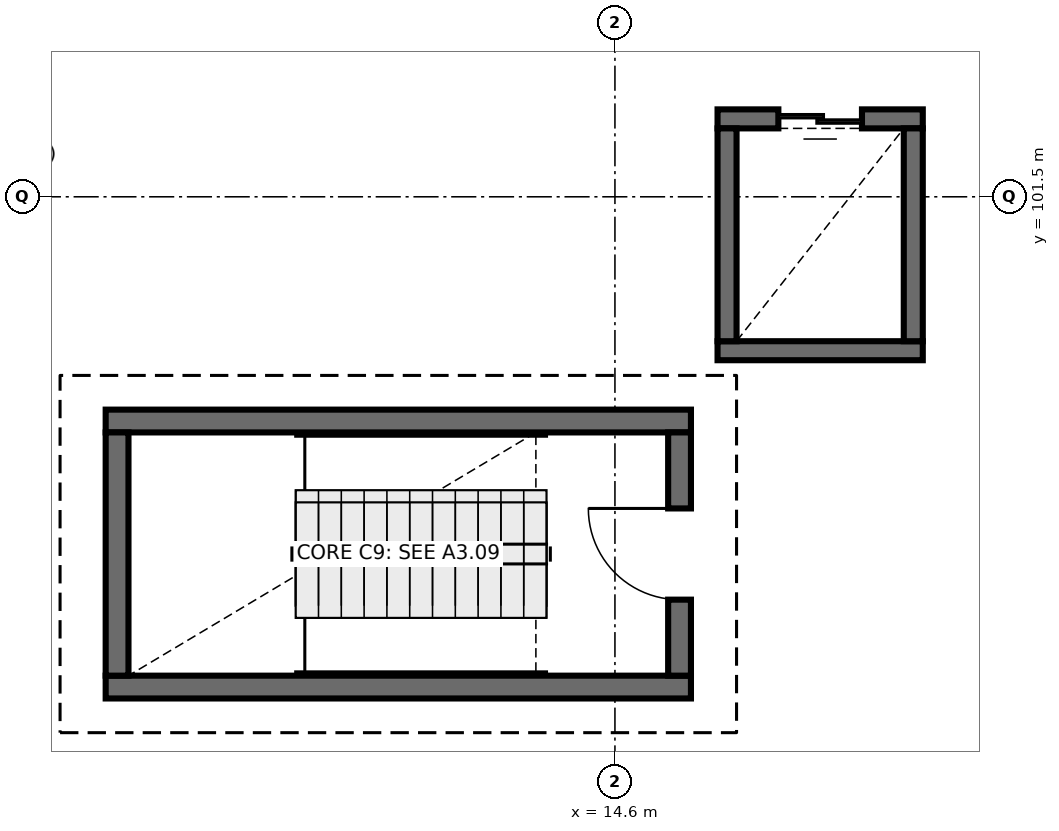
"""IFC4 building model, lengths in metres.
Left out: names, types, materials, properties, quantities, classifications, styles, units other than length and angle.
Written with IfcOpenShell. Run it as: python <this file> out.ifc"""

import sys

from ifc_helpers import new_model, si_unit, direction, frame, frame_2d, origin, place, context, subcontext, project, spatial, rectangle, extrude, element, fill, save


model = new_model("IFC4")
c1 = context("Model", 3, precision=1e-05, world=origin(), true_north=direction((0.0, 1.0)))
c2 = subcontext(c1, "Body", "Model", "MODEL_VIEW")
j1 = project(units=[si_unit("LENGTHUNIT", "METRE"), si_unit("PLANEANGLEUNIT", "RADIAN")], contexts=[c1])
p1 = place(None, origin())
s1 = spatial("IfcSite", under=j1, at=p1, CompositionType="ELEMENT")
p2 = place(p1, origin())
s2 = spatial("IfcBuilding", under=s1, at=p2, CompositionType="ELEMENT")
p3 = place(p2, frame((0.0, 0.0, 9.3)))
s3 = spatial("IfcBuildingStorey", under=s2, at=p3, CompositionType="ELEMENT", Elevation=9.3)
for number, where, z_axis, x_axis in (
    (1, (7.9, 95.05, 0.0), (0.0, 0.0, 1.0), (1.0, 0.0, 0.0)),
    (2, (15.6, 98.55, 0.0), (0.0, 0.0, 1.0), (-1.0, 0.0, 0.0)),
):
    element("IfcWall", number, at=place(p3, frame(where, z_axis=z_axis, x_axis=x_axis)), inside=s3, PredefinedType="SHEAR", context=c2, shape_type="SweptSolid", body=[
        extrude(rectangle(XDim=7.7, YDim=0.3, at=frame_2d((3.85, 0.0))), origin(), (0.0, 0.0, 1.0), 4.5),
    ])
p4 = place(p3, frame((8.05, 98.4, 0.0), z_axis=(0.0, 0.0, 1.0), x_axis=(0.0, -1.0, 0.0)))
e3 = element("IfcWall", 3, at=p4, inside=s3, PredefinedType="SHEAR", context=c2, shape_type="SweptSolid", body=[
    extrude(rectangle(XDim=3.2, YDim=0.3, at=frame_2d((1.6, 0.0))), origin(), (0.0, 0.0, 1.0), 4.5),
])
p5 = place(p3, frame((15.45, 95.2, 0.0), z_axis=(0.0, 0.0, 1.0), x_axis=(0.0, 1.0, 0.0)))
e4 = element("IfcWall", 4, at=p5, inside=s3, PredefinedType="SHEAR", context=c2, shape_type="SweptSolid", body=[
    extrude(rectangle(XDim=3.2, YDim=0.3, at=frame_2d((1.6, 0.0))), origin(), (0.0, 0.0, 1.0), 4.5),
])
p6 = place(p5, frame((1.0, 0.0, 0.0)))
e5 = element("IfcOpeningElement", 5, at=p6, cuts=e4, PredefinedType="OPENING", context=c2, shape_type="SweptSolid", body=[
    extrude(rectangle(XDim=1.2, YDim=2.15, at=frame_2d((0.6, 1.075))), frame((0.0, 0.16, 0.0), z_axis=(0.0, -1.0, 0.0), x_axis=(1.0, 0.0, 0.0)), (0.0, 0.0, 1.0), 0.32),
])
p7 = place(p3, frame((15.95, 99.475, 0.0), z_axis=(0.0, 0.0, 1.0), x_axis=(1.0, 0.0, 0.0)))
e6 = element("IfcWall", 6, at=p7, inside=s3, PredefinedType="SHEAR", context=c2, shape_type="SweptSolid", body=[
    extrude(rectangle(XDim=2.7, YDim=0.25, at=frame_2d((1.35, 0.0))), origin(), (0.0, 0.0, 1.0), 4.5),
])
p8 = place(p3, frame((18.65, 102.525, 0.0), z_axis=(0.0, 0.0, 1.0), x_axis=(-1.0, 0.0, 0.0)))
e7 = element("IfcWall", 7, at=p8, inside=s3, PredefinedType="SHEAR", context=c2, shape_type="SweptSolid", body=[
    extrude(rectangle(XDim=2.7, YDim=0.25, at=frame_2d((1.35, 0.0))), origin(), (0.0, 0.0, 1.0), 4.5),
])
p9 = place(p8, frame((0.8, 0.0, 0.0)))
e8 = element("IfcOpeningElement", 8, at=p9, cuts=e7, PredefinedType="OPENING", context=c2, shape_type="SweptSolid", body=[
    extrude(rectangle(XDim=1.1, YDim=2.15, at=frame_2d((0.55, 1.075))), frame((0.0, 0.135, 0.0), z_axis=(0.0, -1.0, 0.0), x_axis=(1.0, 0.0, 0.0)), (0.0, 0.0, 1.0), 0.27),
])
for number, where, z_axis, x_axis in (
    (9, (16.075, 102.4, 0.0), (0.0, 0.0, 1.0), (0.0, -1.0, 0.0)),
    (10, (18.525, 99.6, 0.0), (0.0, 0.0, 1.0), (0.0, 1.0, 0.0)),
):
    element("IfcWall", number, at=place(p3, frame(where, z_axis=z_axis, x_axis=x_axis)), inside=s3, PredefinedType="SHEAR", context=c2, shape_type="SweptSolid", body=[
        extrude(rectangle(XDim=2.8, YDim=0.25, at=frame_2d((1.4, 0.0))), origin(), (0.0, 0.0, 1.0), 4.5),
    ])
p10 = place(p6, origin())
e11 = element("IfcDoor", 11, at=p10, inside=s3, OperationType="SINGLE_SWING_RIGHT", PredefinedType="DOOR", context=c2, shape_type="SweptSolid", body=[
    extrude(rectangle(XDim=1.2, YDim=2.15, at=frame_2d((0.6, 1.075))), frame((0.0, 0.025, 0.0), z_axis=(0.0, -1.0, 0.0), x_axis=(1.0, 0.0, 0.0)), (0.0, 0.0, 1.0), 0.05),
])
fill(e5, e11)
p11 = place(p9, origin())
e12 = element("IfcDoor", 12, at=p11, inside=s3, OperationType="DOUBLE_DOOR_SLIDING", PredefinedType="DOOR", context=c2, shape_type="SweptSolid", body=[
    extrude(rectangle(XDim=1.1, YDim=2.15, at=frame_2d((0.55, 1.075))), frame((0.0, 0.025, 0.0), z_axis=(0.0, -1.0, 0.0), x_axis=(1.0, 0.0, 0.0)), (0.0, 0.0, 1.0), 0.05),
])
fill(e8, e12)
save(model, sys.argv[1])
